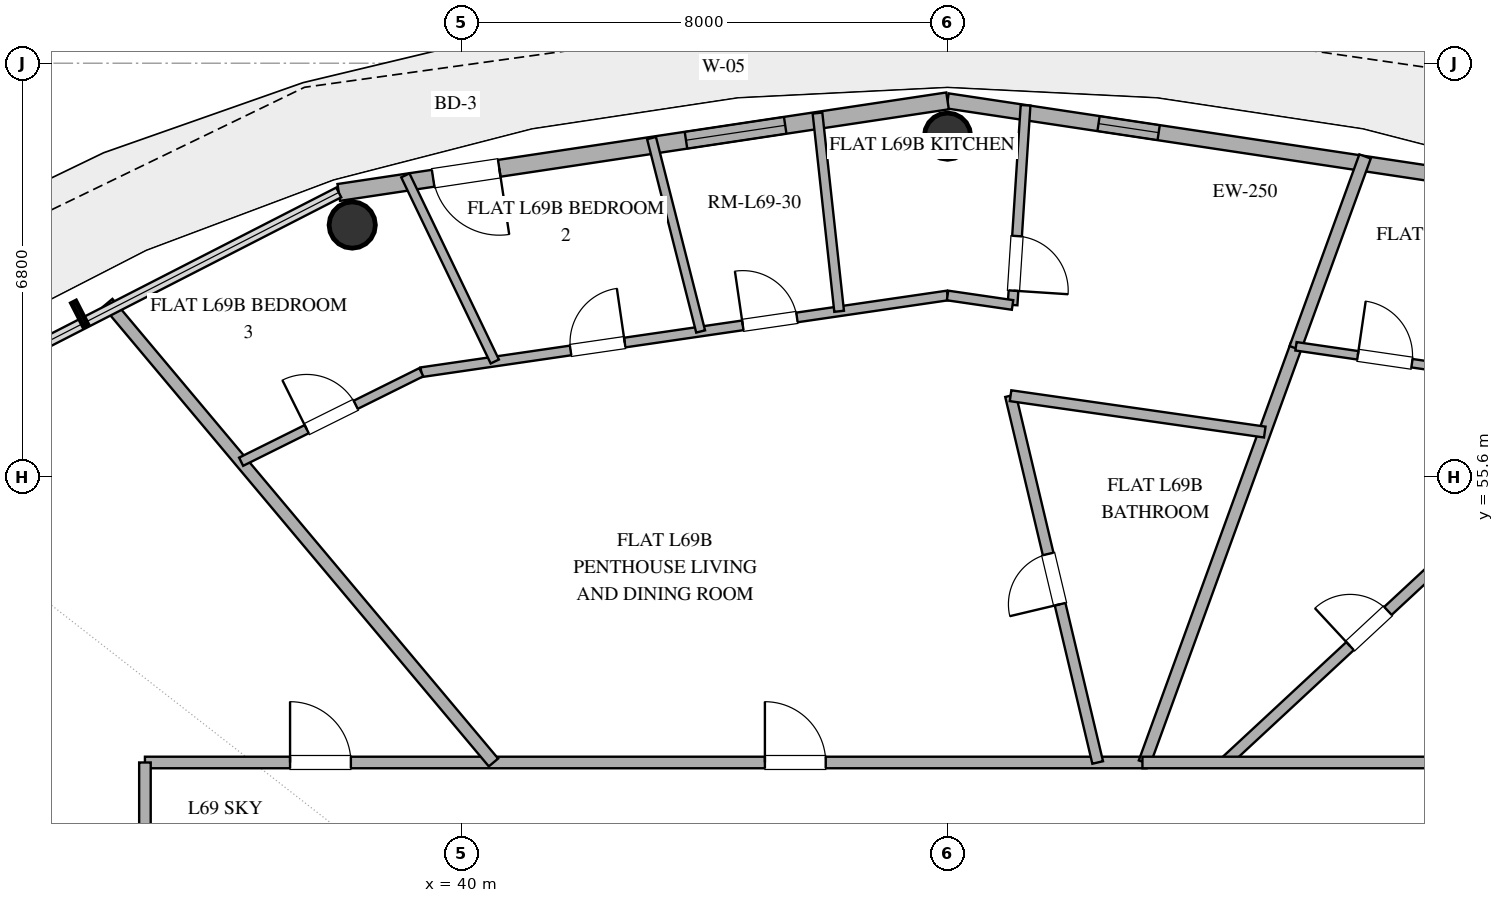
"""IFC4 building model, lengths in metres.
Left out: names, types, materials, properties, quantities, classifications, styles, units other than length and angle.
Written with IfcOpenShell. Run it as: python <this file> out.ifc"""

import sys

from ifc_helpers import new_model, si_unit, direction, frame, frame_2d, origin, origin_2d, place, context, subcontext, project, spatial, rectangle, hollow_circle, extrude, element, fill, save


model = new_model("IFC4")
c1 = context("Model", 3, precision=1e-05, world=origin(), true_north=direction((0.0, 1.0)))
c2 = subcontext(c1, "Body", "Model", "MODEL_VIEW")
j1 = project(units=[si_unit("LENGTHUNIT", "METRE"), si_unit("PLANEANGLEUNIT", "RADIAN")], contexts=[c1])
p1 = place(None, origin())
s1 = spatial("IfcSite", under=j1, at=p1, CompositionType="ELEMENT")
p2 = place(p1, origin())
s2 = spatial("IfcBuilding", under=s1, at=p2, CompositionType="ELEMENT")
p3 = place(p2, frame((0.0, 0.0, 269.4)))
s3 = spatial("IfcBuildingStorey", under=s2, at=p3, CompositionType="ELEMENT", Elevation=269.4)
for number, where, z_axis, x_axis in (
    (1, (48.0, 61.2, 0.0), (0.0, 0.0, 1.0), (1.0, 0.0, 0.0)),
    (2, (38.209, 59.739, 0.0), (0.0, 0.0, 1.0), (1.0, 0.0, 0.0)),
):
    element("IfcColumn", number, at=place(p3, frame(where, z_axis=z_axis, x_axis=x_axis)), inside=s3, PredefinedType="COLUMN", context=c2, shape_type="SweptSolid", body=[
        extrude(hollow_circle(Radius=0.381, WallThickness=0.025, at=origin_2d()), origin(), (0.0, 0.0, 1.0), 3.37),
    ])
p4 = place(p3, frame((58.013, 60.274, 0.0), z_axis=(0.0, 0.0, 1.0), x_axis=(-0.988882522213, 0.148698881169, 0.0)))
e3 = element("IfcWall", 3, at=p4, inside=s3, PredefinedType="SOLIDWALL", context=c2, shape_type="SweptSolid", body=[
    extrude(rectangle(XDim=10.125, YDim=0.25, at=frame_2d((5.062, 0.0))), origin(), (0.0, 0.0, 1.0), 3.37),
])
p5 = place(p4, frame((6.614, 0.0, 1.42)))
e4 = element("IfcOpeningElement", 4, at=p5, cuts=e3, PredefinedType="OPENING", context=c2, shape_type="SweptSolid", body=[
    extrude(rectangle(XDim=1.0, YDim=1.05, at=frame_2d((0.5, 0.525))), frame((0.0, 0.135, 0.0), z_axis=(0.0, -1.0, 0.0), x_axis=(1.0, 0.0, 0.0)), (0.0, 0.0, 1.0), 0.27),
])
p6 = place(p3, frame((48.0, 61.78, 0.0), z_axis=(0.0, 0.0, 1.0), x_axis=(-0.988882522213, -0.148698881169, 0.0)))
e5 = element("IfcWall", 5, at=p6, inside=s3, PredefinedType="SOLIDWALL", context=c2, shape_type="SweptSolid", body=[
    extrude(rectangle(XDim=10.125, YDim=0.28, at=frame_2d((5.062, 0.0))), origin(), (0.0, 0.0, 1.0), 3.37),
])
p7 = place(p6, frame((2.7, 0.0, 0.85)))
e6 = element("IfcOpeningElement", 6, at=p7, cuts=e5, PredefinedType="OPENING", context=c2, shape_type="SweptSolid", body=[
    extrude(rectangle(XDim=1.65, YDim=2.0, at=frame_2d((0.825, 1.0))), frame((0.0, 0.15, 0.0), z_axis=(0.0, -1.0, 0.0), x_axis=(1.0, 0.0, 0.0)), (0.0, 0.0, 1.0), 0.3),
])
p8 = place(p6, frame((7.456, 0.0, 0.0)))
e7 = element("IfcOpeningElement", 7, at=p8, cuts=e5, PredefinedType="OPENING", context=c2, shape_type="SweptSolid", body=[
    extrude(rectangle(XDim=1.1, YDim=2.25, at=frame_2d((0.55, 1.125))), frame((0.0, 0.15, 0.0), z_axis=(0.0, -1.0, 0.0), x_axis=(1.0, 0.0, 0.0)), (0.0, 0.0, 1.0), 0.3),
])
p9 = place(p3, frame((34.8, 50.9, 0.0), z_axis=(0.0, 0.0, 1.0), x_axis=(1.0, 0.0, 0.0)))
e8 = element("IfcWall", 8, at=p9, inside=s3, PredefinedType="PARTITIONING", context=c2, shape_type="SweptSolid", body=[
    extrude(rectangle(XDim=16.473, YDim=0.19, at=frame_2d((8.237, 0.0))), origin(), (0.0, 0.0, 1.0), 2.73),
])
p10 = place(p9, frame((10.196, 0.0, 0.0)))
e9 = element("IfcOpeningElement", 9, at=p10, cuts=e8, PredefinedType="OPENING", context=c2, shape_type="SweptSolid", body=[
    extrude(rectangle(XDim=1.0, YDim=2.2, at=frame_2d((0.5, 1.1))), frame((0.0, 0.105, 0.0), z_axis=(0.0, -1.0, 0.0), x_axis=(1.0, 0.0, 0.0)), (0.0, 0.0, 1.0), 0.21),
])
p11 = place(p9, frame((2.387, 0.0, 0.0)))
e10 = element("IfcOpeningElement", 10, at=p11, cuts=e8, PredefinedType="OPENING", context=c2, shape_type="SweptSolid", body=[
    extrude(rectangle(XDim=1.0, YDim=2.2, at=frame_2d((0.5, 1.1))), frame((0.0, 0.105, 0.0), z_axis=(0.0, -1.0, 0.0), x_axis=(1.0, 0.0, 0.0)), (0.0, 0.0, 1.0), 0.21),
])
p12 = place(p3, frame((52.558, 50.9, 0.0), z_axis=(0.0, 0.0, 1.0), x_axis=(0.732849863846, 0.68039038578, 0.0)))
e11 = element("IfcWall", 11, at=p12, inside=s3, PredefinedType="PLUMBINGWALL", context=c2, shape_type="SweptSolid", body=[
    extrude(rectangle(XDim=6.478, YDim=0.18, at=frame_2d((3.239, 0.0))), origin(), (0.0, 0.0, 1.0), 2.73),
])
p13 = place(p12, frame((2.814, 0.0, 0.0)))
e12 = element("IfcOpeningElement", 12, at=p13, cuts=e11, PredefinedType="OPENING", context=c2, shape_type="SweptSolid", body=[
    extrude(rectangle(XDim=0.85, YDim=2.1, at=frame_2d((0.425, 1.05))), frame((0.0, 0.1, 0.0), z_axis=(0.0, -1.0, 0.0), x_axis=(1.0, 0.0, 0.0)), (0.0, 0.0, 1.0), 0.2),
])
p14 = place(p3, frame((40.532, 50.9, 0.0), z_axis=(0.0, 0.0, 1.0), x_axis=(-0.642777155779, 0.766053214868, 0.0)))
e13 = element("IfcWall", 13, at=p14, inside=s3, PredefinedType="PARTITIONING", context=c2, shape_type="SweptSolid", body=[
    extrude(rectangle(XDim=9.868, YDim=0.2, at=frame_2d((4.934, 0.0))), origin(), (0.0, 0.0, 1.0), 2.73),
])
p15 = place(p3, frame((50.469, 50.9, 0.0), z_axis=(0.0, 0.0, 1.0), x_axis=(-0.231121823084, 0.972924818727, 0.0)))
e14 = element("IfcWall", 14, at=p15, inside=s3, PredefinedType="PLUMBINGWALL", context=c2, shape_type="SweptSolid", body=[
    extrude(rectangle(XDim=6.2, YDim=0.18, at=frame_2d((3.1, 0.0))), origin(), (0.0, 0.0, 1.0), 2.73),
])
p16 = place(p15, frame((2.675, 0.0, 0.0)))
e15 = element("IfcOpeningElement", 15, at=p16, cuts=e14, PredefinedType="OPENING", context=c2, shape_type="SweptSolid", body=[
    extrude(rectangle(XDim=0.85, YDim=2.1, at=frame_2d((0.425, 1.05))), frame((0.0, 0.1, 0.0), z_axis=(0.0, -1.0, 0.0), x_axis=(1.0, 0.0, 0.0)), (0.0, 0.0, 1.0), 0.2),
])
p17 = place(p3, frame((51.239, 50.9, 0.0), z_axis=(0.0, 0.0, 1.0), x_axis=(0.342027045015, 0.939690108748, 0.0)))
e16 = element("IfcWall", 16, at=p17, inside=s3, PredefinedType="PARTITIONING", context=c2, shape_type="SweptSolid", body=[
    extrude(rectangle(XDim=7.316, YDim=0.2, at=frame_2d((3.658, 0.0))), origin(), (0.0, 0.0, 1.0), 2.73),
])
p18 = place(p3, frame((51.205, 50.9, 0.0), z_axis=(0.0, 0.0, 1.0), x_axis=(1.0, 0.0, 0.0)))
e17 = element("IfcWall", 17, at=p18, inside=s3, PredefinedType="PARTITIONING", context=c2, shape_type="SweptSolid", body=[
    extrude(rectangle(XDim=9.995, YDim=0.19, at=frame_2d((4.998, 0.0))), origin(), (0.0, 0.0, 1.0), 2.73),
])
p19 = place(p3, frame((34.8, 46.128, 0.0), z_axis=(0.0, 0.0, 1.0), x_axis=(0.0, 1.0, 0.0)))
e18 = element("IfcWall", 18, at=p19, inside=s3, PredefinedType="PARTITIONING", context=c2, shape_type="SweptSolid", body=[
    extrude(rectangle(XDim=4.771, YDim=0.19, at=frame_2d((2.386, 0.0))), origin(), (0.0, 0.0, 1.0), 2.73),
])
p20 = place(p3, frame((49.036, 56.932, 0.0), z_axis=(0.0, 0.0, 1.0), x_axis=(0.989927514161, -0.141575127434, 0.0)))
e19 = element("IfcWall", 19, at=p20, inside=s3, PredefinedType="PLUMBINGWALL", context=c2, shape_type="SweptSolid", body=[
    extrude(rectangle(XDim=4.223, YDim=0.18, at=frame_2d((2.112, 0.0))), origin(), (0.0, 0.0, 1.0), 2.73),
])
p21 = place(p3, frame((39.345, 57.318, 0.0), z_axis=(0.0, 0.0, 1.0), x_axis=(0.989536136377, 0.144285254977, 0.0)))
e20 = element("IfcWall", 20, at=p21, inside=s3, PredefinedType="PLUMBINGWALL", context=c2, shape_type="SweptSolid", body=[
    extrude(rectangle(XDim=8.746, YDim=0.16, at=frame_2d((4.373, 0.0))), origin(), (0.0, 0.0, 1.0), 2.73),
])
p22 = place(p21, frame((2.481, 0.0, 0.0)))
e21 = element("IfcOpeningElement", 21, at=p22, cuts=e20, PredefinedType="OPENING", context=c2, shape_type="SweptSolid", body=[
    extrude(rectangle(XDim=0.9, YDim=2.1, at=frame_2d((0.45, 1.05))), frame((0.0, 0.09, 0.0), z_axis=(0.0, -1.0, 0.0), x_axis=(1.0, 0.0, 0.0)), (0.0, 0.0, 1.0), 0.18),
])
p23 = place(p21, frame((5.344, 0.0, 0.0)))
e22 = element("IfcOpeningElement", 22, at=p23, cuts=e20, PredefinedType="OPENING", context=c2, shape_type="SweptSolid", body=[
    extrude(rectangle(XDim=0.9, YDim=2.1, at=frame_2d((0.45, 1.05))), frame((0.0, 0.09, 0.0), z_axis=(0.0, -1.0, 0.0), x_axis=(1.0, 0.0, 0.0)), (0.0, 0.0, 1.0), 0.18),
])
p24 = place(p3, frame((40.554, 57.494, 0.0), z_axis=(0.0, 0.0, 1.0), x_axis=(-0.433125990105, 0.901333388206, 0.0)))
e23 = element("IfcWall", 23, at=p24, inside=s3, PredefinedType="PARTITIONING", context=c2, shape_type="SweptSolid", body=[
    extrude(rectangle(XDim=3.396, YDim=0.15, at=frame_2d((1.698, 0.0))), origin(), (0.0, 0.0, 1.0), 2.73),
])
p25 = place(p3, frame((54.867, 60.866, 0.0), z_axis=(0.0, 0.0, 1.0), x_axis=(-0.342000121366, -0.939699907942, 0.0)))
e24 = element("IfcWall", 24, at=p25, inside=s3, PredefinedType="PARTITIONING", context=c2, shape_type="SweptSolid", body=[
    extrude(rectangle(XDim=3.355, YDim=0.2, at=frame_2d((1.678, 0.0))), origin(), (0.0, 0.0, 1.0), 2.73),
])
p26 = place(p3, frame((36.382, 55.846, 0.0), z_axis=(0.0, 0.0, 1.0), x_axis=(0.895604637563, 0.444850911177, 0.0)))
e25 = element("IfcWall", 25, at=p26, inside=s3, PredefinedType="PARTITIONING", context=c2, shape_type="SweptSolid", body=[
    extrude(rectangle(XDim=3.309, YDim=0.15, at=frame_2d((1.654, 0.0))), origin(), (0.0, 0.0, 1.0), 2.73),
])
p27 = place(p26, frame((1.204, 0.0, 0.0)))
e26 = element("IfcOpeningElement", 26, at=p27, cuts=e25, PredefinedType="OPENING", context=c2, shape_type="SweptSolid", body=[
    extrude(rectangle(XDim=0.9, YDim=2.1, at=frame_2d((0.45, 1.05))), frame((0.0, 0.085, 0.0), z_axis=(0.0, -1.0, 0.0), x_axis=(1.0, 0.0, 0.0)), (0.0, 0.0, 1.0), 0.17),
])
p28 = place(p3, frame((49.283, 61.708, 0.0), z_axis=(0.0, 0.0, 1.0), x_axis=(-0.064987599341, -0.997886071619, 0.0)))
e27 = element("IfcWall", 27, at=p28, inside=s3, PredefinedType="PLUMBINGWALL", context=c2, shape_type="SweptSolid", body=[
    extrude(rectangle(XDim=3.291, YDim=0.16, at=frame_2d((1.646, 0.0))), origin(), (0.0, 0.0, 1.0), 2.73),
])
p29 = place(p28, frame((2.156, 0.0, 0.0)))
e28 = element("IfcOpeningElement", 28, at=p29, cuts=e27, PredefinedType="OPENING", context=c2, shape_type="SweptSolid", body=[
    extrude(rectangle(XDim=0.9, YDim=2.1, at=frame_2d((0.45, 1.05))), frame((0.0, 0.09, 0.0), z_axis=(0.0, -1.0, 0.0), x_axis=(1.0, 0.0, 0.0)), (0.0, 0.0, 1.0), 0.18),
])
p30 = place(p3, frame((43.132, 61.169, 0.0), z_axis=(0.0, 0.0, 1.0), x_axis=(0.246087289335, -0.969247670117, 0.0)))
e29 = element("IfcWall", 29, at=p30, inside=s3, PredefinedType="PARTITIONING", context=c2, shape_type="SweptSolid", body=[
    extrude(rectangle(XDim=3.282, YDim=0.15, at=frame_2d((1.641, 0.0))), origin(), (0.0, 0.0, 1.0), 2.73),
])
p31 = place(p3, frame((46.217, 58.32, 0.0), z_axis=(0.0, 0.0, 1.0), x_axis=(-0.108559889868, 0.994089910577, 0.0)))
e30 = element("IfcWall", 30, at=p31, inside=s3, PredefinedType="PLUMBINGWALL", context=c2, shape_type="SweptSolid", body=[
    extrude(rectangle(XDim=3.279, YDim=0.16, at=frame_2d((1.639, 0.0))), origin(), (0.0, 0.0, 1.0), 2.73),
])
p32 = place(p3, frame((53.73, 57.744, 0.0), z_axis=(0.0, 0.0, 1.0), x_axis=(0.989530523264, -0.144323745545, 0.0)))
e31 = element("IfcWall", 31, at=p32, inside=s3, PredefinedType="PARTITIONING", context=c2, shape_type="SweptSolid", body=[
    extrude(rectangle(XDim=2.955, YDim=0.14, at=frame_2d((1.478, 0.0))), origin(), (0.0, 0.0, 1.0), 2.73),
])
p33 = place(p32, frame((1.028, 0.0, 0.0)))
e32 = element("IfcOpeningElement", 32, at=p33, cuts=e31, PredefinedType="OPENING", context=c2, shape_type="SweptSolid", body=[
    extrude(rectangle(XDim=0.9, YDim=2.1, at=frame_2d((0.45, 1.05))), frame((0.0, 0.08, 0.0), z_axis=(0.0, -1.0, 0.0), x_axis=(1.0, 0.0, 0.0)), (0.0, 0.0, 1.0), 0.16),
])
p34 = place(p3, frame((49.069, 58.424, 0.0), z_axis=(0.0, 0.0, 1.0), x_axis=(-0.989520204584, 0.144394476074, 0.0)))
e33 = element("IfcWall", 33, at=p34, inside=s3, PredefinedType="PLUMBINGWALL", context=c2, shape_type="SweptSolid", body=[
    extrude(rectangle(XDim=1.08, YDim=0.16, at=frame_2d((0.54, 0.0))), origin(), (0.0, 0.0, 1.0), 2.73),
])
p35 = place(p7, origin())
e34 = element("IfcWindow", 34, at=p35, inside=s3, PartitioningType="SINGLE_PANEL", PredefinedType="WINDOW", context=c2, shape_type="SweptSolid", body=[
    extrude(rectangle(XDim=1.65, YDim=2.0, at=frame_2d((0.825, 1.0))), frame((0.0, 0.03, 0.0), z_axis=(0.0, -1.0, 0.0), x_axis=(1.0, 0.0, 0.0)), (0.0, 0.0, 1.0), 0.06),
])
fill(e6, e34)
p36 = place(p8, origin())
e35 = element("IfcDoor", 35, at=p36, inside=s3, OperationType="SINGLE_SWING_LEFT", PredefinedType="DOOR", context=c2, shape_type="SweptSolid", body=[
    extrude(rectangle(XDim=1.1, YDim=2.25, at=frame_2d((0.55, 1.125))), frame((0.0, 0.025, 0.0), z_axis=(0.0, -1.0, 0.0), x_axis=(1.0, 0.0, 0.0)), (0.0, 0.0, 1.0), 0.05),
])
fill(e7, e35)
p37 = place(p5, origin())
e36 = element("IfcWindow", 36, at=p37, inside=s3, PartitioningType="SINGLE_PANEL", PredefinedType="WINDOW", context=c2, shape_type="SweptSolid", body=[
    extrude(rectangle(XDim=1.0, YDim=1.05, at=frame_2d((0.5, 0.525))), frame((0.0, 0.03, 0.0), z_axis=(0.0, -1.0, 0.0), x_axis=(1.0, 0.0, 0.0)), (0.0, 0.0, 1.0), 0.06),
])
fill(e4, e36)
p38 = place(p10, origin())
e37 = element("IfcDoor", 37, at=p38, inside=s3, OperationType="SINGLE_SWING_LEFT", PredefinedType="DOOR", context=c2, shape_type="SweptSolid", body=[
    extrude(rectangle(XDim=1.0, YDim=2.2, at=frame_2d((0.5, 1.1))), frame((0.0, 0.025, 0.0), z_axis=(0.0, -1.0, 0.0), x_axis=(1.0, 0.0, 0.0)), (0.0, 0.0, 1.0), 0.05),
])
fill(e9, e37)
p39 = place(p11, origin())
e38 = element("IfcDoor", 38, at=p39, inside=s3, OperationType="SINGLE_SWING_LEFT", PredefinedType="DOOR", context=c2, shape_type="SweptSolid", body=[
    extrude(rectangle(XDim=1.0, YDim=2.2, at=frame_2d((0.5, 1.1))), frame((0.0, 0.025, 0.0), z_axis=(0.0, -1.0, 0.0), x_axis=(1.0, 0.0, 0.0)), (0.0, 0.0, 1.0), 0.05),
])
fill(e10, e38)
p40 = place(p13, origin())
e39 = element("IfcDoor", 39, at=p40, inside=s3, OperationType="SINGLE_SWING_LEFT", PredefinedType="DOOR", context=c2, shape_type="SweptSolid", body=[
    extrude(rectangle(XDim=0.85, YDim=2.1, at=frame_2d((0.425, 1.05))), frame((0.0, 0.025, 0.0), z_axis=(0.0, -1.0, 0.0), x_axis=(1.0, 0.0, 0.0)), (0.0, 0.0, 1.0), 0.05),
])
fill(e12, e39)
p41 = place(p16, origin())
e40 = element("IfcDoor", 40, at=p41, inside=s3, OperationType="SINGLE_SWING_LEFT", PredefinedType="DOOR", context=c2, shape_type="SweptSolid", body=[
    extrude(rectangle(XDim=0.85, YDim=2.1, at=frame_2d((0.425, 1.05))), frame((0.0, 0.025, 0.0), z_axis=(0.0, -1.0, 0.0), x_axis=(1.0, 0.0, 0.0)), (0.0, 0.0, 1.0), 0.05),
])
fill(e15, e40)
p42 = place(p22, origin())
e41 = element("IfcDoor", 41, at=p42, inside=s3, OperationType="SINGLE_SWING_RIGHT", PredefinedType="DOOR", context=c2, shape_type="SweptSolid", body=[
    extrude(rectangle(XDim=0.9, YDim=2.1, at=frame_2d((0.45, 1.05))), frame((0.0, 0.025, 0.0), z_axis=(0.0, -1.0, 0.0), x_axis=(1.0, 0.0, 0.0)), (0.0, 0.0, 1.0), 0.05),
])
fill(e21, e41)
p43 = place(p23, origin())
e42 = element("IfcDoor", 42, at=p43, inside=s3, OperationType="SINGLE_SWING_LEFT", PredefinedType="DOOR", context=c2, shape_type="SweptSolid", body=[
    extrude(rectangle(XDim=0.9, YDim=2.1, at=frame_2d((0.45, 1.05))), frame((0.0, 0.025, 0.0), z_axis=(0.0, -1.0, 0.0), x_axis=(1.0, 0.0, 0.0)), (0.0, 0.0, 1.0), 0.05),
])
fill(e22, e42)
p44 = place(p27, origin())
e43 = element("IfcDoor", 43, at=p44, inside=s3, OperationType="SINGLE_SWING_LEFT", PredefinedType="DOOR", context=c2, shape_type="SweptSolid", body=[
    extrude(rectangle(XDim=0.9, YDim=2.1, at=frame_2d((0.45, 1.05))), frame((0.0, 0.025, 0.0), z_axis=(0.0, -1.0, 0.0), x_axis=(1.0, 0.0, 0.0)), (0.0, 0.0, 1.0), 0.05),
])
fill(e26, e43)
p45 = place(p29, origin())
e44 = element("IfcDoor", 44, at=p45, inside=s3, OperationType="SINGLE_SWING_RIGHT", PredefinedType="DOOR", context=c2, shape_type="SweptSolid", body=[
    extrude(rectangle(XDim=0.9, YDim=2.1, at=frame_2d((0.45, 1.05))), frame((0.0, 0.025, 0.0), z_axis=(0.0, -1.0, 0.0), x_axis=(1.0, 0.0, 0.0)), (0.0, 0.0, 1.0), 0.05),
])
fill(e28, e44)
p46 = place(p33, origin())
e45 = element("IfcDoor", 45, at=p46, inside=s3, OperationType="SINGLE_SWING_LEFT", PredefinedType="DOOR", context=c2, shape_type="SweptSolid", body=[
    extrude(rectangle(XDim=0.9, YDim=2.1, at=frame_2d((0.45, 1.05))), frame((0.0, 0.025, 0.0), z_axis=(0.0, -1.0, 0.0), x_axis=(1.0, 0.0, 0.0)), (0.0, 0.0, 1.0), 0.05),
])
fill(e32, e45)
save(model, sys.argv[1])
